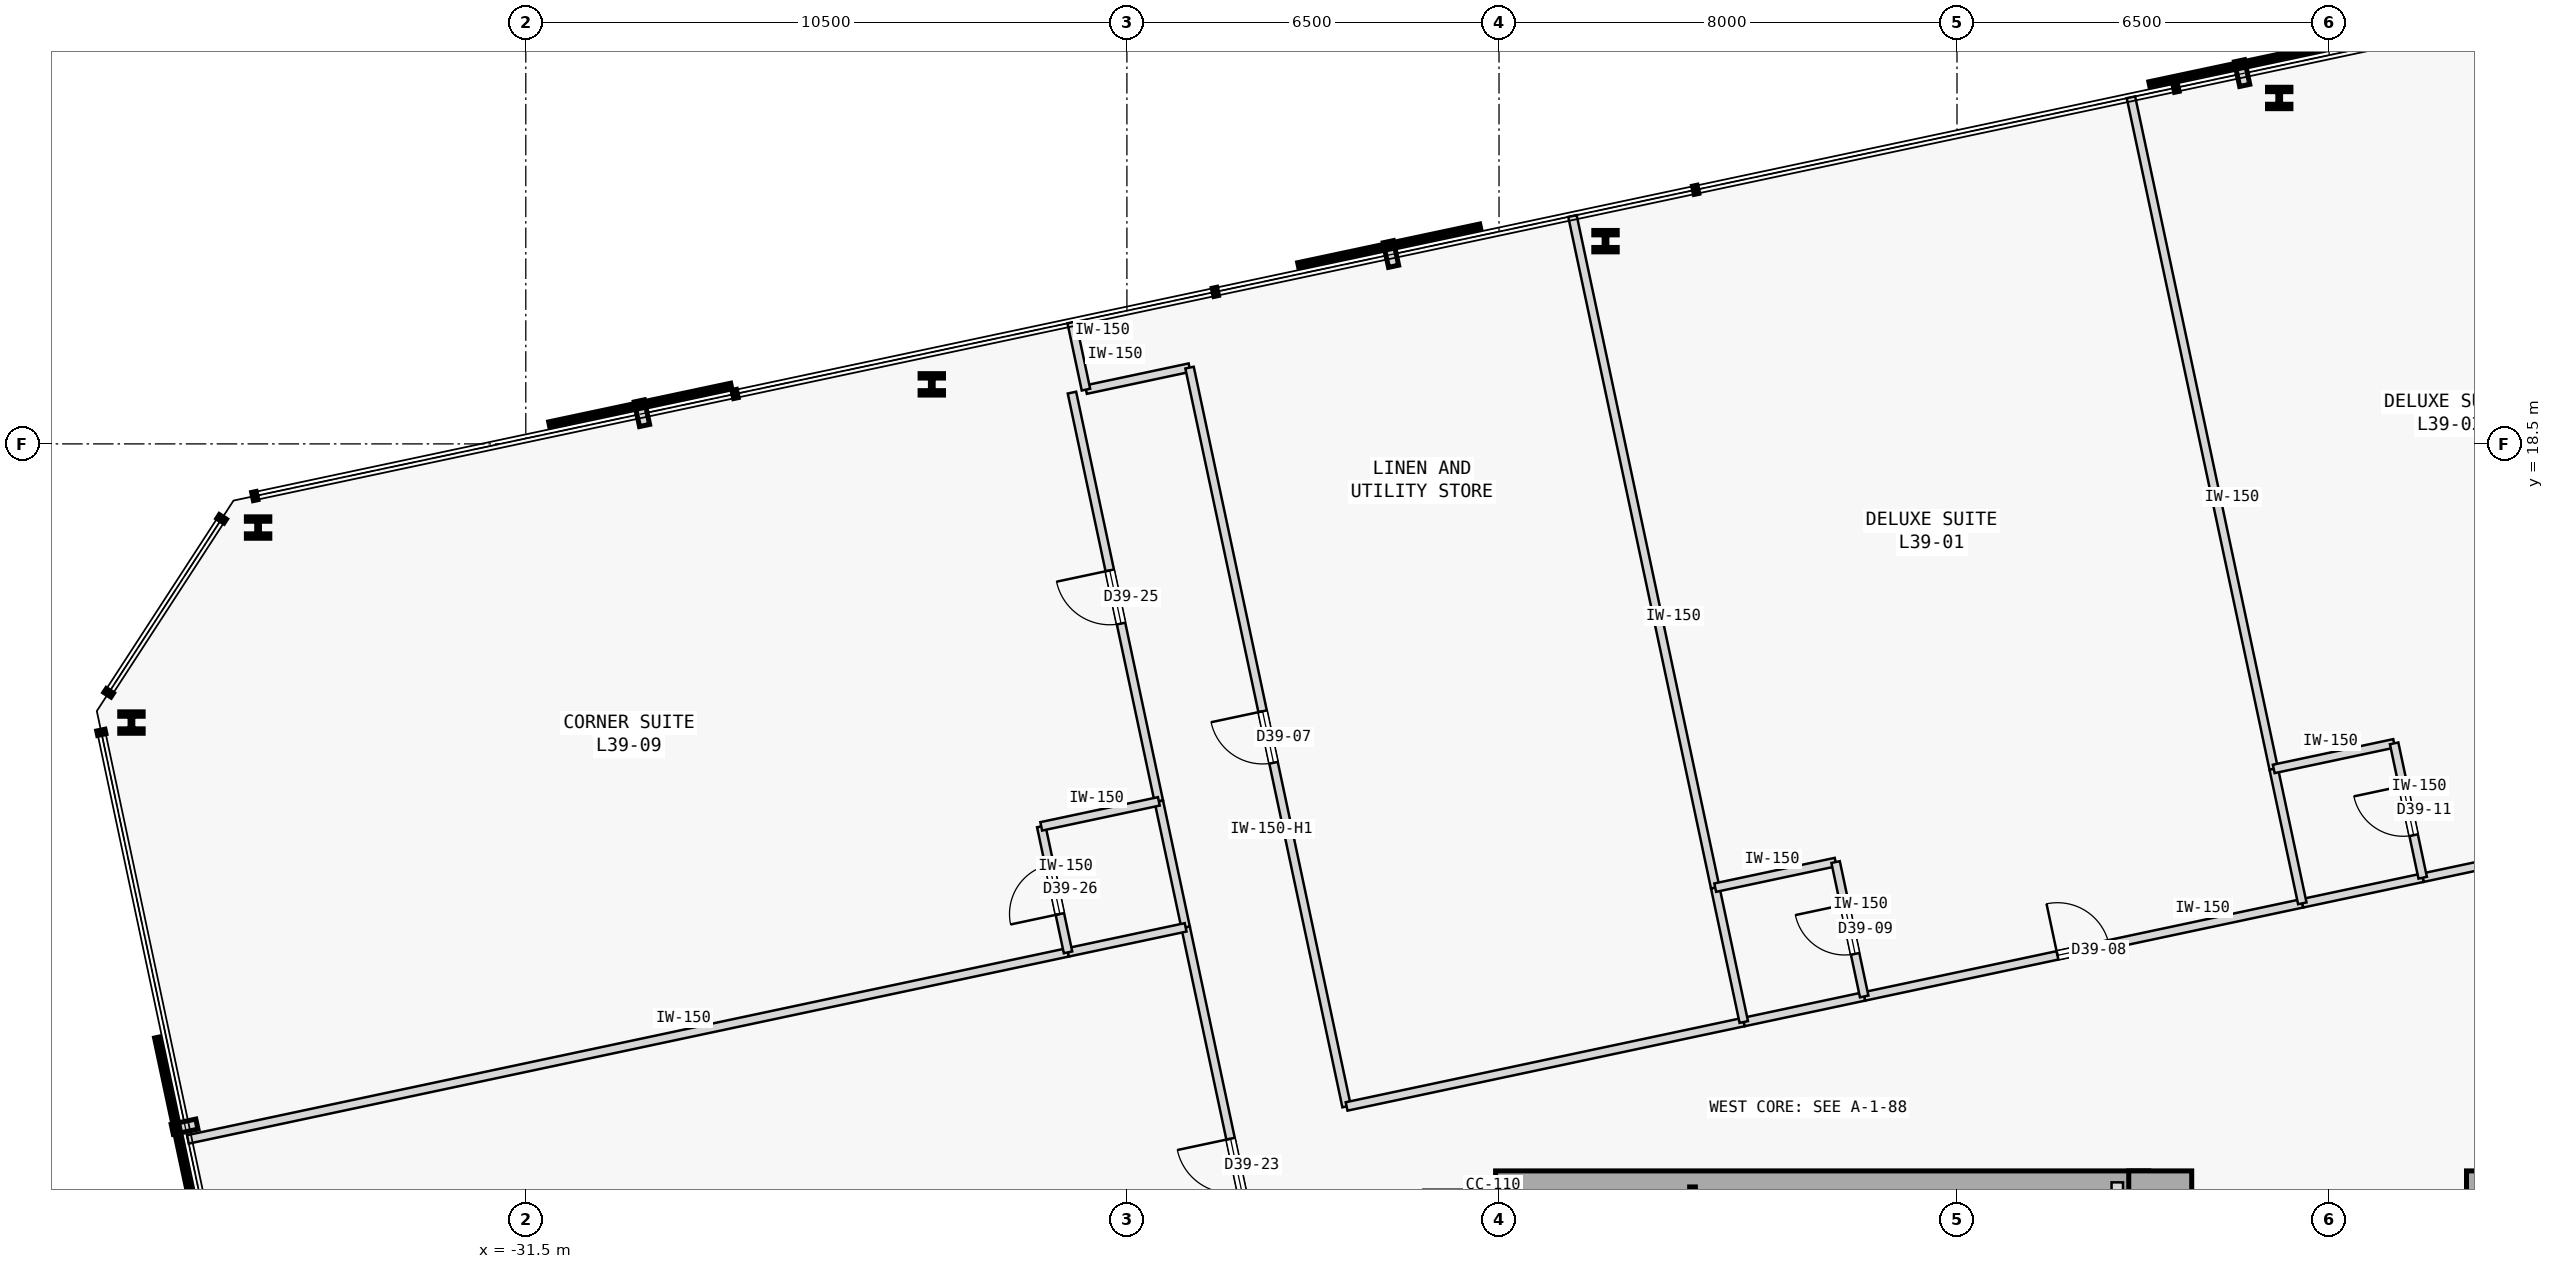
"""IFC4 building model, lengths in metres.
Left out: names, types, materials, properties, quantities, classifications, styles, units other than length and angle.
Written with IfcOpenShell. Run it as: python <this file> out.ifc"""

import sys

from ifc_helpers import new_model, si_unit, direction, frame, frame_2d, origin, origin_2d, place, context, subcontext, project, spatial, rectangle, hollow_rectangle, i_section, extrude, element, fill, save


model = new_model("IFC4")
c1 = context("Model", 3, precision=1e-05, world=origin(), true_north=direction((0.0, 1.0)))
c2 = subcontext(c1, "Body", "Model", "MODEL_VIEW")
j1 = project(units=[si_unit("LENGTHUNIT", "METRE"), si_unit("PLANEANGLEUNIT", "RADIAN")], contexts=[c1])
p1 = place(None, origin())
s1 = spatial("IfcSite", under=j1, at=p1, CompositionType="ELEMENT")
p2 = place(p1, origin())
s2 = spatial("IfcBuilding", under=s1, at=p2, CompositionType="ELEMENT")
p3 = place(p2, frame((0.0, 0.0, 154.8)))
s3 = spatial("IfcBuildingStorey", under=s2, at=p3, CompositionType="ELEMENT", Elevation=154.8)
for number, where, z_axis, x_axis in (
    (1, (-2.95, 5.25, 0.0), (0.0, 0.0, 1.0), (1.0, 0.0, 0.0)),
    (2, (2.95, 5.25, 0.0), (0.0, 0.0, 1.0), (1.0, 0.0, 0.0)),
):
    element("IfcColumn", number, at=place(p3, frame(where, z_axis=z_axis, x_axis=x_axis)), inside=s3, PredefinedType="COLUMN", context=c2, shape_type="SweptSolid", body=[
        extrude(rectangle(XDim=1.1, YDim=1.1, at=origin_2d()), origin(), (0.0, 0.0, 1.0), 3.4),
    ])
p4 = place(p3, frame((-14.56, 5.6, 0.0), z_axis=(0.0, 0.0, 1.0), x_axis=(1.0, 0.0, 0.0)))
e3 = element("IfcWall", 3, at=p4, inside=s3, PredefinedType="SHEAR", context=c2, shape_type="SweptSolid", body=[
    extrude(rectangle(XDim=11.41, YDim=0.4, at=frame_2d((5.705, 0.0))), origin(), (0.0, 0.0, 1.0), 3.175),
])
p5 = place(p3, frame((-11.12, 5.42, 0.0), z_axis=(0.0, 0.0, 1.0), x_axis=(1.0, 0.0, 0.0)))
e4 = element("IfcColumn", 4, at=p5, inside=s3, PredefinedType="COLUMN", context=c2, shape_type="SweptSolid", body=[
    extrude(hollow_rectangle(XDim=0.1, YDim=0.2, WallThickness=0.008, at=origin_2d()), origin(), (0.0, 0.0, 1.0), 3.4),
])
for number, where, z_axis, x_axis in (
    (5, (-0.872, 24.543, 0.0), (0.0, 0.0, 1.0), (1.0, 0.0, 0.0)),
    (6, (-12.64, 22.042, 0.0), (0.0, 0.0, 1.0), (1.0, 0.0, 0.0)),
    (7, (-24.408, 19.54, 0.0), (0.0, 0.0, 1.0), (1.0, 0.0, 0.0)),
    (8, (-36.176, 17.039, 0.0), (0.0, 0.0, 1.0), (1.0, 0.0, 0.0)),
    (9, (-38.389, 13.632, 0.0), (0.0, 0.0, 1.0), (1.0, 0.0, 0.0)),
):
    element("IfcColumn", number, at=place(p3, frame(where, z_axis=z_axis, x_axis=x_axis)), inside=s3, PredefinedType="COLUMN", context=c2, shape_type="SweptSolid", body=[
        extrude(i_section(OverallWidth=0.409, OverallDepth=0.374, WebThickness=0.048, FlangeThickness=0.077, FilletRadius=0.015, at=origin_2d()), origin(), (0.0, 0.0, 1.0), 3.4),
    ])
p6 = place(p3, frame((-3.7, -1.15, 0.0), z_axis=(0.0, 0.0, 1.0), x_axis=(0.0, 1.0, 0.0)))
e10 = element("IfcWall", 10, at=p6, inside=s3, PredefinedType="STANDARD", context=c2, shape_type="SweptSolid", body=[
    extrude(rectangle(XDim=6.75, YDim=0.2, at=frame_2d((3.375, 0.0))), origin(), (0.0, 0.0, 1.0), 3.175),
])
p7 = place(p6, frame((3.6, 0.0, 0.0)))
e11 = element("IfcOpeningElement", 11, at=p7, cuts=e10, PredefinedType="OPENING", context=c2, shape_type="SweptSolid", body=[
    extrude(rectangle(XDim=0.92, YDim=2.15, at=frame_2d((0.46, 1.075))), frame((0.0, 0.11, 0.0), z_axis=(0.0, -1.0, 0.0), x_axis=(1.0, 0.0, 0.0)), (0.0, 0.0, 1.0), 0.22),
])
p8 = place(p3, frame((-21.715, 19.448, 0.0), z_axis=(0.0, 0.0, 1.0), x_axis=(0.978160192495, 0.207852442415, 0.0)))
e12 = element("IfcWall", 12, at=p8, inside=s3, PredefinedType="PARTITIONING", context=c2, shape_type="SweptSolid", body=[
    extrude(rectangle(XDim=1.85, YDim=0.15, at=frame_2d((0.925, 0.0))), origin(), (0.0, 0.0, 1.0), 3.175),
])
p9 = place(p3, frame((-17.162, 6.926, 0.0), z_axis=(0.0, 0.0, 1.0), x_axis=(-0.207911421929, 0.978147657888, 0.0)))
e13 = element("IfcWall", 13, at=p9, inside=s3, PredefinedType="PARTITIONING", context=c2, shape_type="SweptSolid", body=[
    extrude(rectangle(XDim=13.195, YDim=0.15, at=frame_2d((6.598, 0.0))), origin(), (0.0, 0.0, 1.0), 2.725),
])
p10 = place(p9, frame((6.137, 0.0, 0.0)))
e14 = element("IfcOpeningElement", 14, at=p10, cuts=e13, PredefinedType="OPENING", context=c2, shape_type="SweptSolid", body=[
    extrude(rectangle(XDim=0.92, YDim=2.15, at=frame_2d((0.46, 1.075))), frame((0.0, 0.085, 0.0), z_axis=(0.0, -1.0, 0.0), x_axis=(1.0, 0.0, 0.0)), (0.0, 0.0, 1.0), 0.17),
])
p11 = place(p3, frame((-17.162, 6.926, 0.0), z_axis=(0.0, 0.0, 1.0), x_axis=(0.978143627193, 0.207930383978, 0.0)))
e15 = element("IfcWall", 15, at=p11, inside=s3, PredefinedType="PARTITIONING", context=c2, shape_type="SweptSolid", body=[
    extrude(rectangle(XDim=7.093, YDim=0.15, at=frame_2d((3.546, 0.0))), origin(), (0.0, 0.0, 1.0), 3.175),
])
p12 = place(p3, frame((-8.121, 8.848, 0.0), z_axis=(0.0, 0.0, 1.0), x_axis=(0.978146318695, 0.207917722244, 0.0)))
e16 = element("IfcWall", 16, at=p12, inside=s3, PredefinedType="PARTITIONING", context=c2, shape_type="SweptSolid", body=[
    extrude(rectangle(XDim=7.824, YDim=0.15, at=frame_2d((3.912, 0.0))), origin(), (0.0, 0.0, 1.0), 3.175),
])
p13 = place(p12, frame((3.452, 0.0, 0.0)))
e17 = element("IfcOpeningElement", 17, at=p13, cuts=e16, PredefinedType="OPENING", context=c2, shape_type="SweptSolid", body=[
    extrude(rectangle(XDim=0.92, YDim=2.15, at=frame_2d((0.46, 1.075))), frame((0.0, 0.085, 0.0), z_axis=(0.0, -1.0, 0.0), x_axis=(1.0, 0.0, 0.0)), (0.0, 0.0, 1.0), 0.17),
])
p14 = place(p3, frame((-10.224, 8.401, 0.0), z_axis=(0.0, 0.0, 1.0), x_axis=(0.978146728319, 0.207915795165, 0.0)))
e18 = element("IfcWall", 18, at=p14, inside=s3, PredefinedType="PARTITIONING", context=c2, shape_type="SweptSolid", body=[
    extrude(rectangle(XDim=2.15, YDim=0.15, at=frame_2d((1.075, 0.0))), origin(), (0.0, 0.0, 1.0), 3.175),
])
p15 = place(p3, frame((1.635, 10.921, 0.0), z_axis=(0.0, 0.0, 1.0), x_axis=(0.978147881284, 0.207910370927, 0.0)))
e19 = element("IfcWall", 19, at=p15, inside=s3, PredefinedType="PARTITIONING", context=c2, shape_type="SweptSolid", body=[
    extrude(rectangle(XDim=6.449, YDim=0.15, at=frame_2d((3.225, 0.0))), origin(), (0.0, 0.0, 1.0), 3.175),
])
p16 = place(p15, frame((2.764, 0.0, 0.0)))
e20 = element("IfcOpeningElement", 20, at=p16, cuts=e19, PredefinedType="OPENING", context=c2, shape_type="SweptSolid", body=[
    extrude(rectangle(XDim=0.92, YDim=2.15, at=frame_2d((0.46, 1.075))), frame((0.0, 0.085, 0.0), z_axis=(0.0, -1.0, 0.0), x_axis=(1.0, 0.0, 0.0)), (0.0, 0.0, 1.0), 0.17),
])
p17 = place(p3, frame((-0.469, 10.474, 0.0), z_axis=(0.0, 0.0, 1.0), x_axis=(0.978146728319, 0.207915795165, 0.0)))
e21 = element("IfcWall", 21, at=p17, inside=s3, PredefinedType="PARTITIONING", context=c2, shape_type="SweptSolid", body=[
    extrude(rectangle(XDim=2.15, YDim=0.15, at=frame_2d((1.075, 0.0))), origin(), (0.0, 0.0, 1.0), 3.175),
])
p18 = place(p3, frame((-18.207, 1.74, 0.0), z_axis=(0.0, 0.0, 1.0), x_axis=(-0.207922306475, 0.978145344246, 0.0)))
e22 = element("IfcWall", 22, at=p18, inside=s3, PredefinedType="PARTITIONING", context=c2, shape_type="SweptSolid", body=[
    extrude(rectangle(XDim=8.5, YDim=0.15, at=frame_2d((4.25, 0.0))), origin(), (0.0, 0.0, 1.0), 3.175),
])
p19 = place(p18, frame((3.775, 0.0, 0.0)))
e23 = element("IfcOpeningElement", 23, at=p19, cuts=e22, PredefinedType="OPENING", context=c2, shape_type="SweptSolid", body=[
    extrude(rectangle(XDim=0.95, YDim=2.15, at=frame_2d((0.475, 1.075))), frame((0.0, 0.085, 0.0), z_axis=(0.0, -1.0, 0.0), x_axis=(1.0, 0.0, 0.0)), (0.0, 0.0, 1.0), 0.17),
])
p20 = place(p3, frame((-20.442, 12.255, 0.0), z_axis=(0.0, 0.0, 1.0), x_axis=(-0.207916352354, 0.978146609882, 0.0)))
e24 = element("IfcWall", 24, at=p20, inside=s3, PredefinedType="PARTITIONING", context=c2, shape_type="SweptSolid", body=[
    extrude(rectangle(XDim=7.3, YDim=0.15, at=frame_2d((3.65, 0.0))), origin(), (0.0, 0.0, 1.0), 3.175),
])
p21 = place(p20, frame((3.175, 0.0, 0.0)))
e25 = element("IfcOpeningElement", 25, at=p21, cuts=e24, PredefinedType="OPENING", context=c2, shape_type="SweptSolid", body=[
    extrude(rectangle(XDim=0.95, YDim=2.15, at=frame_2d((0.475, 1.075))), frame((0.0, 0.085, 0.0), z_axis=(0.0, -1.0, 0.0), x_axis=(1.0, 0.0, 0.0)), (0.0, 0.0, 1.0), 0.17),
])
p22 = place(p3, frame((-19.974, 10.055, 0.0), z_axis=(0.0, 0.0, 1.0), x_axis=(-0.207913264065, 0.978147266328, 0.0)))
e26 = element("IfcWall", 26, at=p22, inside=s3, PredefinedType="PARTITIONING", context=c2, shape_type="SweptSolid", body=[
    extrude(rectangle(XDim=2.25, YDim=0.15, at=frame_2d((1.125, 0.0))), origin(), (0.0, 0.0, 1.0), 3.175),
])
p23 = place(p3, frame((-10.723, 10.748, 0.0), z_axis=(0.0, 0.0, 1.0), x_axis=(-0.207914988081, 0.978146899873, 0.0)))
e27 = element("IfcWall", 27, at=p23, inside=s3, PredefinedType="PARTITIONING", context=c2, shape_type="SweptSolid", body=[
    extrude(rectangle(XDim=11.995, YDim=0.15, at=frame_2d((5.998, 0.0))), origin(), (0.0, 0.0, 1.0), 3.175),
])
p24 = place(p3, frame((-10.224, 8.401, 0.0), z_axis=(0.0, 0.0, 1.0), x_axis=(-0.207917150959, 0.978146440129, 0.0)))
e28 = element("IfcWall", 28, at=p24, inside=s3, PredefinedType="PARTITIONING", context=c2, shape_type="SweptSolid", body=[
    extrude(rectangle(XDim=2.4, YDim=0.15, at=frame_2d((1.2, 0.0))), origin(), (0.0, 0.0, 1.0), 3.175),
])
p25 = place(p3, frame((-21.715, 19.448, 0.0), z_axis=(0.0, 0.0, 1.0), x_axis=(-0.20795853359, 0.978137642823, 0.0)))
e29 = element("IfcWall", 29, at=p25, inside=s3, PredefinedType="PARTITIONING", context=c2, shape_type="SweptSolid", body=[
    extrude(rectangle(XDim=1.2, YDim=0.15, at=frame_2d((0.6, 0.0))), origin(), (0.0, 0.0, 1.0), 3.175),
])
p26 = place(p3, frame((-10.723, 10.748, 0.0), z_axis=(0.0, 0.0, 1.0), x_axis=(0.978146728319, 0.207915795165, 0.0)))
e30 = element("IfcWall", 30, at=p26, inside=s3, PredefinedType="PARTITIONING", context=c2, shape_type="SweptSolid", body=[
    extrude(rectangle(XDim=2.15, YDim=0.15, at=frame_2d((1.075, 0.0))), origin(), (0.0, 0.0, 1.0), 3.175),
])
p27 = place(p3, frame((-8.121, 8.848, 0.0), z_axis=(0.0, 0.0, 1.0), x_axis=(-0.207917150959, 0.978146440129, 0.0)))
e31 = element("IfcWall", 31, at=p27, inside=s3, PredefinedType="PARTITIONING", context=c2, shape_type="SweptSolid", body=[
    extrude(rectangle(XDim=2.4, YDim=0.15, at=frame_2d((1.2, 0.0))), origin(), (0.0, 0.0, 1.0), 3.175),
])
p28 = place(p27, frame((0.76, 0.0, 0.0)))
e32 = element("IfcOpeningElement", 32, at=p28, cuts=e31, PredefinedType="OPENING", context=c2, shape_type="SweptSolid", body=[
    extrude(rectangle(XDim=0.88, YDim=2.15, at=frame_2d((0.44, 1.075))), frame((0.0, 0.085, 0.0), z_axis=(0.0, -1.0, 0.0), x_axis=(1.0, 0.0, 0.0)), (0.0, 0.0, 1.0), 0.17),
])
p29 = place(p3, frame((-0.967, 12.822, 0.0), z_axis=(0.0, 0.0, 1.0), x_axis=(-0.207914988081, 0.978146899873, 0.0)))
e33 = element("IfcWall", 33, at=p29, inside=s3, PredefinedType="PARTITIONING", context=c2, shape_type="SweptSolid", body=[
    extrude(rectangle(XDim=11.995, YDim=0.15, at=frame_2d((5.998, 0.0))), origin(), (0.0, 0.0, 1.0), 3.175),
])
p30 = place(p3, frame((-0.469, 10.474, 0.0), z_axis=(0.0, 0.0, 1.0), x_axis=(-0.207819824493, 0.978167123015, 0.0)))
e34 = element("IfcWall", 34, at=p30, inside=s3, PredefinedType="PARTITIONING", context=c2, shape_type="SweptSolid", body=[
    extrude(rectangle(XDim=2.4, YDim=0.15, at=frame_2d((1.2, 0.0))), origin(), (0.0, 0.0, 1.0), 3.175),
])
p31 = place(p3, frame((-0.967, 12.822, 0.0), z_axis=(0.0, 0.0, 1.0), x_axis=(0.978169816376, 0.207807146966, 0.0)))
e35 = element("IfcWall", 35, at=p31, inside=s3, PredefinedType="PARTITIONING", context=c2, shape_type="SweptSolid", body=[
    extrude(rectangle(XDim=2.15, YDim=0.15, at=frame_2d((1.075, 0.0))), origin(), (0.0, 0.0, 1.0), 3.175),
])
p32 = place(p3, frame((1.635, 10.921, 0.0), z_axis=(0.0, 0.0, 1.0), x_axis=(-0.207840504985, 0.978162729042, 0.0)))
e36 = element("IfcWall", 36, at=p32, inside=s3, PredefinedType="PARTITIONING", context=c2, shape_type="SweptSolid", body=[
    extrude(rectangle(XDim=2.4, YDim=0.15, at=frame_2d((1.2, 0.0))), origin(), (0.0, 0.0, 1.0), 3.175),
])
p33 = place(p32, frame((0.76, 0.0, 0.0)))
e37 = element("IfcOpeningElement", 37, at=p33, cuts=e36, PredefinedType="OPENING", context=c2, shape_type="SweptSolid", body=[
    extrude(rectangle(XDim=0.88, YDim=2.15, at=frame_2d((0.44, 1.075))), frame((0.0, 0.085, 0.0), z_axis=(0.0, -1.0, 0.0), x_axis=(1.0, 0.0, 0.0)), (0.0, 0.0, 1.0), 0.17),
])
p34 = place(p3, frame((-37.403, 6.35, 0.0), z_axis=(0.0, 0.0, 1.0), x_axis=(0.978149296727, 0.207903711638, 0.0)))
e38 = element("IfcWall", 38, at=p34, inside=s3, PredefinedType="PARTITIONING", context=c2, shape_type="SweptSolid", body=[
    extrude(rectangle(XDim=15.718, YDim=0.15, at=frame_2d((7.859, 0.0))), origin(), (0.0, 0.0, 1.0), 3.175),
])
p35 = place(p3, frame((-22.029, 9.618, 0.0), z_axis=(0.0, 0.0, 1.0), x_axis=(0.978134617382, 0.207972763311, 0.0)))
e39 = element("IfcWall", 39, at=p35, inside=s3, PredefinedType="PARTITIONING", context=c2, shape_type="SweptSolid", body=[
    extrude(rectangle(XDim=2.1, YDim=0.15, at=frame_2d((1.05, 0.0))), origin(), (0.0, 0.0, 1.0), 3.175),
])
p36 = place(p3, frame((-22.029, 9.618, 0.0), z_axis=(0.0, 0.0, 1.0), x_axis=(-0.207891197838, 0.978151956427, 0.0)))
e40 = element("IfcWall", 40, at=p36, inside=s3, PredefinedType="PARTITIONING", context=c2, shape_type="SweptSolid", body=[
    extrude(rectangle(XDim=2.25, YDim=0.15, at=frame_2d((1.125, 0.0))), origin(), (0.0, 0.0, 1.0), 3.175),
])
p37 = place(p36, frame((0.685, 0.0, 0.0)))
e41 = element("IfcOpeningElement", 41, at=p37, cuts=e40, PredefinedType="OPENING", context=c2, shape_type="SweptSolid", body=[
    extrude(rectangle(XDim=0.88, YDim=2.15, at=frame_2d((0.44, 1.075))), frame((0.0, 0.085, 0.0), z_axis=(0.0, -1.0, 0.0), x_axis=(1.0, 0.0, 0.0)), (0.0, 0.0, 1.0), 0.17),
])
p38 = place(p3, frame((-22.496, 11.819, 0.0), z_axis=(0.0, 0.0, 1.0), x_axis=(0.97815826, 0.207861536591, 0.0)))
e42 = element("IfcWall", 42, at=p38, inside=s3, PredefinedType="PARTITIONING", context=c2, shape_type="SweptSolid", body=[
    extrude(rectangle(XDim=2.1, YDim=0.15, at=frame_2d((1.05, 0.0))), origin(), (0.0, 0.0, 1.0), 3.175),
])
p39 = place(p10, origin())
e43 = element("IfcDoor", 43, at=p39, inside=s3, OperationType="SINGLE_SWING_RIGHT", PredefinedType="DOOR", context=c2, shape_type="SweptSolid", body=[
    extrude(rectangle(XDim=0.92, YDim=2.15, at=frame_2d((0.46, 1.075))), frame((0.0, 0.025, 0.0), z_axis=(0.0, -1.0, 0.0), x_axis=(1.0, 0.0, 0.0)), (0.0, 0.0, 1.0), 0.05),
])
fill(e14, e43)
p40 = place(p13, origin())
e44 = element("IfcDoor", 44, at=p40, inside=s3, OperationType="SINGLE_SWING_LEFT", PredefinedType="DOOR", context=c2, shape_type="SweptSolid", body=[
    extrude(rectangle(XDim=0.92, YDim=2.15, at=frame_2d((0.46, 1.075))), frame((0.0, 0.025, 0.0), z_axis=(0.0, -1.0, 0.0), x_axis=(1.0, 0.0, 0.0)), (0.0, 0.0, 1.0), 0.05),
])
fill(e17, e44)
p41 = place(p28, origin())
e45 = element("IfcDoor", 45, at=p41, inside=s3, OperationType="SINGLE_SWING_RIGHT", PredefinedType="DOOR", context=c2, shape_type="SweptSolid", body=[
    extrude(rectangle(XDim=0.88, YDim=2.15, at=frame_2d((0.44, 1.075))), frame((0.0, 0.025, 0.0), z_axis=(0.0, -1.0, 0.0), x_axis=(1.0, 0.0, 0.0)), (0.0, 0.0, 1.0), 0.05),
])
fill(e32, e45)
p42 = place(p33, origin())
e46 = element("IfcDoor", 46, at=p42, inside=s3, OperationType="SINGLE_SWING_RIGHT", PredefinedType="DOOR", context=c2, shape_type="SweptSolid", body=[
    extrude(rectangle(XDim=0.88, YDim=2.15, at=frame_2d((0.44, 1.075))), frame((0.0, 0.025, 0.0), z_axis=(0.0, -1.0, 0.0), x_axis=(1.0, 0.0, 0.0)), (0.0, 0.0, 1.0), 0.05),
])
fill(e37, e46)
p43 = place(p19, origin())
e47 = element("IfcDoor", 47, at=p43, inside=s3, OperationType="SINGLE_SWING_RIGHT", PredefinedType="DOOR", context=c2, shape_type="SweptSolid", body=[
    extrude(rectangle(XDim=0.95, YDim=2.15, at=frame_2d((0.475, 1.075))), frame((0.0, 0.025, 0.0), z_axis=(0.0, -1.0, 0.0), x_axis=(1.0, 0.0, 0.0)), (0.0, 0.0, 1.0), 0.05),
])
fill(e23, e47)
p44 = place(p21, origin())
e48 = element("IfcDoor", 48, at=p44, inside=s3, OperationType="SINGLE_SWING_RIGHT", PredefinedType="DOOR", context=c2, shape_type="SweptSolid", body=[
    extrude(rectangle(XDim=0.95, YDim=2.15, at=frame_2d((0.475, 1.075))), frame((0.0, 0.025, 0.0), z_axis=(0.0, -1.0, 0.0), x_axis=(1.0, 0.0, 0.0)), (0.0, 0.0, 1.0), 0.05),
])
fill(e25, e48)
p45 = place(p37, origin())
e49 = element("IfcDoor", 49, at=p45, inside=s3, OperationType="SINGLE_SWING_LEFT", PredefinedType="DOOR", context=c2, shape_type="SweptSolid", body=[
    extrude(rectangle(XDim=0.88, YDim=2.15, at=frame_2d((0.44, 1.075))), frame((0.0, 0.025, 0.0), z_axis=(0.0, -1.0, 0.0), x_axis=(1.0, 0.0, 0.0)), (0.0, 0.0, 1.0), 0.05),
])
fill(e41, e49)
save(model, sys.argv[1])
